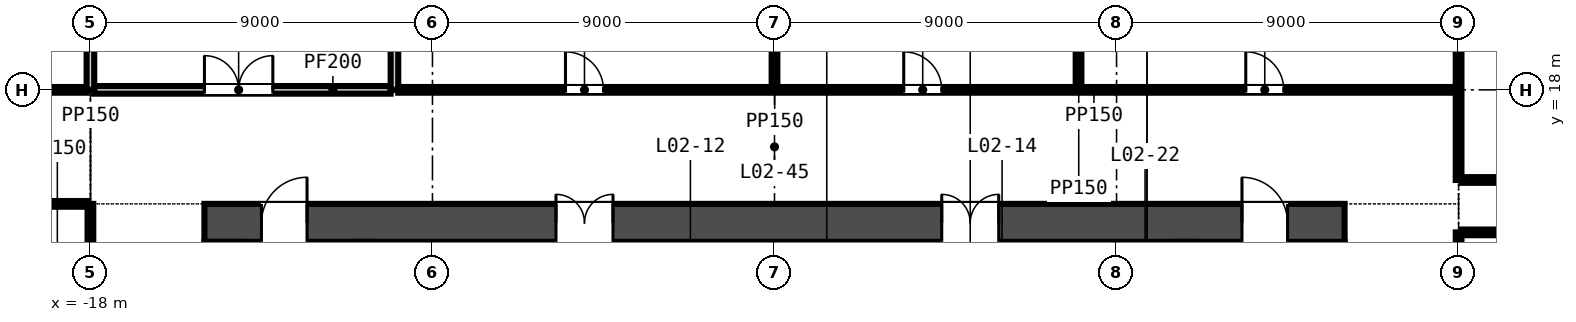
"""IFC4 building model, lengths in metres.
Left out: names, types, materials, properties, quantities, classifications, styles, units other than length and angle.
Written with IfcOpenShell. Run it as: python <this file> out.ifc"""

import sys

from ifc_helpers import new_model, si_unit, direction, frame, frame_2d, origin, place, context, subcontext, project, spatial, rectangle, extrude, element, fill, save


model = new_model("IFC4")
c1 = context("Model", 3, precision=1e-05, world=origin(), true_north=direction((0.0, 1.0)))
c2 = subcontext(c1, "Body", "Model", "MODEL_VIEW")
j1 = project(units=[si_unit("LENGTHUNIT", "METRE"), si_unit("PLANEANGLEUNIT", "RADIAN")], contexts=[c1])
p1 = place(None, origin())
s1 = spatial("IfcSite", under=j1, at=p1, CompositionType="ELEMENT")
p2 = place(p1, origin())
s2 = spatial("IfcBuilding", under=s1, at=p2, CompositionType="ELEMENT")
p3 = place(p2, frame((0.0, 0.0, 18.0)))
s3 = spatial("IfcBuildingStorey", under=s2, at=p3, CompositionType="ELEMENT", Elevation=18.0)
p4 = place(p3, frame((-15.0, 14.5, -0.4), z_axis=(0.0, 0.0, 1.0), x_axis=(1.0, 0.0, 0.0)))
e1 = element("IfcWall", 1, at=p4, inside=s3, PredefinedType="SOLIDWALL", context=c2, shape_type="SweptSolid", body=[
    extrude(rectangle(XDim=30.0, YDim=1.0, at=frame_2d((15.0, 0.0))), origin(), (0.0, 0.0, 1.0), 4.6),
])
p5 = place(p4, frame((9.25, 0.0, 0.4)))
e2 = element("IfcOpeningElement", 2, at=p5, cuts=e1, PredefinedType="OPENING", context=c2, shape_type="SweptSolid", body=[
    extrude(rectangle(XDim=1.5, YDim=2.1, at=frame_2d((0.75, 1.05))), frame((0.0, 0.51, 0.0), z_axis=(0.0, -1.0, 0.0), x_axis=(1.0, 0.0, 0.0)), (0.0, 0.0, 1.0), 1.02),
])
p6 = place(p4, frame((19.4, 0.0, 0.4)))
e3 = element("IfcOpeningElement", 3, at=p6, cuts=e1, PredefinedType="OPENING", context=c2, shape_type="SweptSolid", body=[
    extrude(rectangle(XDim=1.5, YDim=2.1, at=frame_2d((0.75, 1.05))), frame((0.0, 0.51, 0.0), z_axis=(0.0, -1.0, 0.0), x_axis=(1.0, 0.0, 0.0)), (0.0, 0.0, 1.0), 1.02),
])
p7 = place(p4, frame((1.5, 0.0, 0.4)))
e4 = element("IfcOpeningElement", 4, at=p7, cuts=e1, PredefinedType="OPENING", context=c2, shape_type="SweptSolid", body=[
    extrude(rectangle(XDim=1.2, YDim=2.1, at=frame_2d((0.6, 1.05))), frame((0.0, 0.51, 0.0), z_axis=(0.0, -1.0, 0.0), x_axis=(1.0, 0.0, 0.0)), (0.0, 0.0, 1.0), 1.02),
])
p8 = place(p4, frame((27.3, 0.0, 0.4)))
e5 = element("IfcOpeningElement", 5, at=p8, cuts=e1, PredefinedType="OPENING", context=c2, shape_type="SweptSolid", body=[
    extrude(rectangle(XDim=1.2, YDim=2.1, at=frame_2d((0.6, 1.05))), frame((0.0, 0.51, 0.0), z_axis=(0.0, -1.0, 0.0), x_axis=(1.0, 0.0, 0.0)), (0.0, 0.0, 1.0), 1.02),
])
for number, where, z_axis, x_axis in (
    (6, (-8.275, 11.3, 0.0), (0.0, 0.0, 1.0), (0.0, 1.0, 0.0)),
    (7, (-5.875, 11.3, 0.0), (0.0, 0.0, 1.0), (0.0, 1.0, 0.0)),
    (8, (-4.125, 11.3, 0.0), (0.0, 0.0, 1.0), (0.0, 1.0, 0.0)),
    (9, (-1.325, 11.3, 0.0), (0.0, 0.0, 1.0), (0.0, 1.0, 0.0)),
    (10, (1.475, 11.3, 0.0), (0.0, 0.0, 1.0), (0.0, 1.0, 0.0)),
    (11, (4.275, 11.3, 0.0), (0.0, 0.0, 1.0), (0.0, 1.0, 0.0)),
    (12, (6.025, 11.3, 0.0), (0.0, 0.0, 1.0), (0.0, 1.0, 0.0)),
    (13, (8.825, 11.3, 0.0), (0.0, 0.0, 1.0), (0.0, 1.0, 0.0)),
):
    element("IfcWall", number, at=place(p3, frame(where, z_axis=z_axis, x_axis=x_axis)), inside=s3, PredefinedType="PARTITIONING", context=c2, shape_type="SweptSolid", body=[
        extrude(rectangle(XDim=2.7, YDim=0.25, at=frame_2d((1.35, 0.0))), origin(), (0.0, 0.0, 1.0), 4.2),
    ])
p9 = place(p3, frame((18.075, 14.25, 0.0), z_axis=(0.0, 0.0, 1.0), x_axis=(1.0, 0.0, 0.0)))
e14 = element("IfcWall", 14, at=p9, inside=s3, PredefinedType="PARTITIONING", context=c2, shape_type="SweptSolid", body=[
    extrude(rectangle(XDim=5.175, YDim=0.15, at=frame_2d((2.587, 0.0))), origin(), (0.0, 0.0, 1.0), 4.2),
])
p10 = place(p3, frame((-27.035, 15.0, 0.0), z_axis=(0.0, 0.0, 1.0), x_axis=(1.0, 0.0, 0.0)))
e15 = element("IfcWall", 15, at=p10, inside=s3, PredefinedType="PARTITIONING", context=c2, shape_type="SweptSolid", body=[
    extrude(rectangle(XDim=8.96, YDim=0.15, at=frame_2d((4.48, 0.0))), origin(), (0.0, 0.0, 1.0), 4.2),
])
p11 = place(p3, frame((18.075, 15.629, 0.0), z_axis=(0.0, 0.0, 1.0), x_axis=(1.0, 0.0, 0.0)))
e16 = element("IfcWall", 16, at=p11, inside=s3, PredefinedType="PARTITIONING", context=c2, shape_type="SweptSolid", body=[
    extrude(rectangle(XDim=7.482, YDim=0.15, at=frame_2d((3.741, 0.0))), origin(), (0.0, 0.0, 1.0), 4.2),
])
p12 = place(p11, frame((4.4, 0.0, 0.0)))
e17 = element("IfcOpeningElement", 17, at=p12, cuts=e16, PredefinedType="OPENING", context=c2, shape_type="SweptSolid", body=[
    extrude(rectangle(XDim=1.8, YDim=2.4, at=frame_2d((0.9, 1.2))), frame((0.0, 0.085, 0.0), z_axis=(0.0, -1.0, 0.0), x_axis=(1.0, 0.0, 0.0)), (0.0, 0.0, 1.0), 0.17),
])
p13 = place(p3, frame((-26.142, 18.0, 0.0), z_axis=(0.0, 0.0, 1.0), x_axis=(1.0, 0.0, 0.0)))
e18 = element("IfcWall", 18, at=p13, inside=s3, PredefinedType="PARTITIONING", context=c2, shape_type="SweptSolid", body=[
    extrude(rectangle(XDim=8.042, YDim=0.15, at=frame_2d((4.021, 0.0))), origin(), (0.0, 0.0, 1.0), 4.2),
])
p14 = place(p3, frame((-17.9, 18.0, 0.0), z_axis=(0.0, 0.0, 1.0), x_axis=(1.0, 0.0, 0.0)))
e19 = element("IfcWall", 19, at=p14, inside=s3, PredefinedType="PARTITIONING", context=c2, shape_type="SweptSolid", body=[
    extrude(rectangle(XDim=7.8, YDim=0.2, at=frame_2d((3.9, 0.0))), origin(), (0.0, 0.0, 1.0), 4.2),
])
p15 = place(p14, frame((2.9, 0.0, 0.0)))
e20 = element("IfcOpeningElement", 20, at=p15, cuts=e19, PredefinedType="OPENING", context=c2, shape_type="SweptSolid", body=[
    extrude(rectangle(XDim=1.8, YDim=2.4, at=frame_2d((0.9, 1.2))), frame((0.0, 0.11, 0.0), z_axis=(0.0, -1.0, 0.0), x_axis=(1.0, 0.0, 0.0)), (0.0, 0.0, 1.0), 0.22),
])
p16 = place(p3, frame((-9.9, 18.0, 0.0), z_axis=(0.0, 0.0, 1.0), x_axis=(1.0, 0.0, 0.0)))
e21 = element("IfcWall", 21, at=p16, inside=s3, PredefinedType="PARTITIONING", context=c2, shape_type="SweptSolid", body=[
    extrude(rectangle(XDim=27.825, YDim=0.15, at=frame_2d((13.913, 0.0))), origin(), (0.0, 0.0, 1.0), 4.2),
])
p17 = place(p16, frame((4.4, 0.0, 0.0)))
e22 = element("IfcOpeningElement", 22, at=p17, cuts=e21, PredefinedType="OPENING", context=c2, shape_type="SweptSolid", body=[
    extrude(rectangle(XDim=1.0, YDim=2.1, at=frame_2d((0.5, 1.05))), frame((0.0, 0.085, 0.0), z_axis=(0.0, -1.0, 0.0), x_axis=(1.0, 0.0, 0.0)), (0.0, 0.0, 1.0), 0.17),
])
p18 = place(p16, frame((13.3, 0.0, 0.0)))
e23 = element("IfcOpeningElement", 23, at=p18, cuts=e21, PredefinedType="OPENING", context=c2, shape_type="SweptSolid", body=[
    extrude(rectangle(XDim=1.0, YDim=2.1, at=frame_2d((0.5, 1.05))), frame((0.0, 0.085, 0.0), z_axis=(0.0, -1.0, 0.0), x_axis=(1.0, 0.0, 0.0)), (0.0, 0.0, 1.0), 0.17),
])
p19 = place(p16, frame((22.3, 0.0, 0.0)))
e24 = element("IfcOpeningElement", 24, at=p19, cuts=e21, PredefinedType="OPENING", context=c2, shape_type="SweptSolid", body=[
    extrude(rectangle(XDim=1.0, YDim=2.1, at=frame_2d((0.5, 1.05))), frame((0.0, 0.085, 0.0), z_axis=(0.0, -1.0, 0.0), x_axis=(1.0, 0.0, 0.0)), (0.0, 0.0, 1.0), 0.17),
])
p20 = place(p3, frame((-18.0, 1.251, 0.0), z_axis=(0.0, 0.0, 1.0), x_axis=(0.0, 1.0, 0.0)))
e25 = element("IfcWall", 25, at=p20, inside=s3, PredefinedType="PARTITIONING", context=c2, shape_type="SweptSolid", body=[
    extrude(rectangle(XDim=13.749, YDim=0.15, at=frame_2d((6.875, 0.0))), origin(), (0.0, 0.0, 1.0), 4.2),
])
for number, where, z_axis, x_axis in (
    (26, (-18.0, 18.0, 0.0), (0.0, 0.0, 1.0), (0.0, 1.0, 0.0)),
    (27, (-10.0, 18.0, 0.0), (0.0, 0.0, 1.0), (0.0, 1.0, 0.0)),
):
    element("IfcWall", number, at=place(p3, frame(where, z_axis=z_axis, x_axis=x_axis)), inside=s3, PredefinedType="PARTITIONING", context=c2, shape_type="SweptSolid", body=[
        extrude(rectangle(XDim=13.1, YDim=0.2, at=frame_2d((6.55, 0.0))), origin(), (0.0, 0.0, 1.0), 4.2),
    ])
p21 = place(p3, frame((0.0, 18.075, 0.0), z_axis=(0.0, 0.0, 1.0), x_axis=(0.0, 1.0, 0.0)))
e28 = element("IfcWall", 28, at=p21, inside=s3, PredefinedType="PARTITIONING", context=c2, shape_type="SweptSolid", body=[
    extrude(rectangle(XDim=8.175, YDim=0.15, at=frame_2d((4.087, 0.0))), origin(), (0.0, 0.0, 1.0), 3.521),
])
p22 = place(p3, frame((8.0, 18.075, 0.0), z_axis=(0.0, 0.0, 1.0), x_axis=(0.0, 1.0, 0.0)))
e29 = element("IfcWall", 29, at=p22, inside=s3, PredefinedType="PARTITIONING", context=c2, shape_type="SweptSolid", body=[
    extrude(rectangle(XDim=13.025, YDim=0.15, at=frame_2d((6.513, 0.0))), origin(), (0.0, 0.0, 1.0), 4.2),
])
p23 = place(p3, frame((18.0, 0.0, 0.0), z_axis=(0.0, 0.0, 1.0), x_axis=(0.0, 1.0, 0.0)))
e30 = element("IfcWall", 30, at=p23, inside=s3, PredefinedType="PARTITIONING", context=c2, shape_type="SweptSolid", body=[
    extrude(rectangle(XDim=14.25, YDim=0.15, at=frame_2d((7.125, 0.0))), origin(), (0.0, 0.0, 1.0), 4.2),
])
p24 = place(p3, frame((18.0, 15.629, 0.0), z_axis=(0.0, 0.0, 1.0), x_axis=(0.0, 1.0, 0.0)))
e31 = element("IfcWall", 31, at=p24, inside=s3, PredefinedType="PARTITIONING", context=c2, shape_type="SweptSolid", body=[
    extrude(rectangle(XDim=9.85, YDim=0.15, at=frame_2d((4.925, 0.0))), origin(), (0.0, 0.0, 1.0), 4.2),
])
p25 = place(p5, origin())
e32 = element("IfcDoor", 32, at=p25, inside=s3, OperationType="DOUBLE_DOOR_SINGLE_SWING", PredefinedType="DOOR", context=c2, shape_type="SweptSolid", body=[
    extrude(rectangle(XDim=1.5, YDim=2.1, at=frame_2d((0.75, 1.05))), frame((0.0, 0.025, 0.0), z_axis=(0.0, -1.0, 0.0), x_axis=(1.0, 0.0, 0.0)), (0.0, 0.0, 1.0), 0.05),
])
fill(e2, e32)
p26 = place(p6, origin())
e33 = element("IfcDoor", 33, at=p26, inside=s3, OperationType="DOUBLE_DOOR_SINGLE_SWING", PredefinedType="DOOR", context=c2, shape_type="SweptSolid", body=[
    extrude(rectangle(XDim=1.5, YDim=2.1, at=frame_2d((0.75, 1.05))), frame((0.0, 0.025, 0.0), z_axis=(0.0, -1.0, 0.0), x_axis=(1.0, 0.0, 0.0)), (0.0, 0.0, 1.0), 0.05),
])
fill(e3, e33)
p27 = place(p7, origin())
e34 = element("IfcDoor", 34, at=p27, inside=s3, OperationType="SINGLE_SWING_RIGHT", PredefinedType="DOOR", context=c2, shape_type="SweptSolid", body=[
    extrude(rectangle(XDim=1.2, YDim=2.1, at=frame_2d((0.6, 1.05))), frame((0.0, 0.025, 0.0), z_axis=(0.0, -1.0, 0.0), x_axis=(1.0, 0.0, 0.0)), (0.0, 0.0, 1.0), 0.05),
])
fill(e4, e34)
p28 = place(p8, origin())
e35 = element("IfcDoor", 35, at=p28, inside=s3, OperationType="SINGLE_SWING_LEFT", PredefinedType="DOOR", context=c2, shape_type="SweptSolid", body=[
    extrude(rectangle(XDim=1.2, YDim=2.1, at=frame_2d((0.6, 1.05))), frame((0.0, 0.025, 0.0), z_axis=(0.0, -1.0, 0.0), x_axis=(1.0, 0.0, 0.0)), (0.0, 0.0, 1.0), 0.05),
])
fill(e5, e35)
p29 = place(p15, origin())
e36 = element("IfcDoor", 36, at=p29, inside=s3, OperationType="SINGLE_SWING_LEFT", PredefinedType="DOOR", context=c2, shape_type="SweptSolid", body=[
    extrude(rectangle(XDim=1.8, YDim=2.4, at=frame_2d((0.9, 1.2))), frame((0.0, 0.025, 0.0), z_axis=(0.0, -1.0, 0.0), x_axis=(1.0, 0.0, 0.0)), (0.0, 0.0, 1.0), 0.05),
])
fill(e20, e36)
p30 = place(p17, origin())
e37 = element("IfcDoor", 37, at=p30, inside=s3, OperationType="SINGLE_SWING_LEFT", PredefinedType="DOOR", context=c2, shape_type="SweptSolid", body=[
    extrude(rectangle(XDim=1.0, YDim=2.1, at=frame_2d((0.5, 1.05))), frame((0.0, 0.025, 0.0), z_axis=(0.0, -1.0, 0.0), x_axis=(1.0, 0.0, 0.0)), (0.0, 0.0, 1.0), 0.05),
])
fill(e22, e37)
p31 = place(p18, origin())
e38 = element("IfcDoor", 38, at=p31, inside=s3, OperationType="SINGLE_SWING_LEFT", PredefinedType="DOOR", context=c2, shape_type="SweptSolid", body=[
    extrude(rectangle(XDim=1.0, YDim=2.1, at=frame_2d((0.5, 1.05))), frame((0.0, 0.025, 0.0), z_axis=(0.0, -1.0, 0.0), x_axis=(1.0, 0.0, 0.0)), (0.0, 0.0, 1.0), 0.05),
])
fill(e23, e38)
p32 = place(p19, origin())
e39 = element("IfcDoor", 39, at=p32, inside=s3, OperationType="SINGLE_SWING_LEFT", PredefinedType="DOOR", context=c2, shape_type="SweptSolid", body=[
    extrude(rectangle(XDim=1.0, YDim=2.1, at=frame_2d((0.5, 1.05))), frame((0.0, 0.025, 0.0), z_axis=(0.0, -1.0, 0.0), x_axis=(1.0, 0.0, 0.0)), (0.0, 0.0, 1.0), 0.05),
])
fill(e24, e39)
save(model, sys.argv[1])
